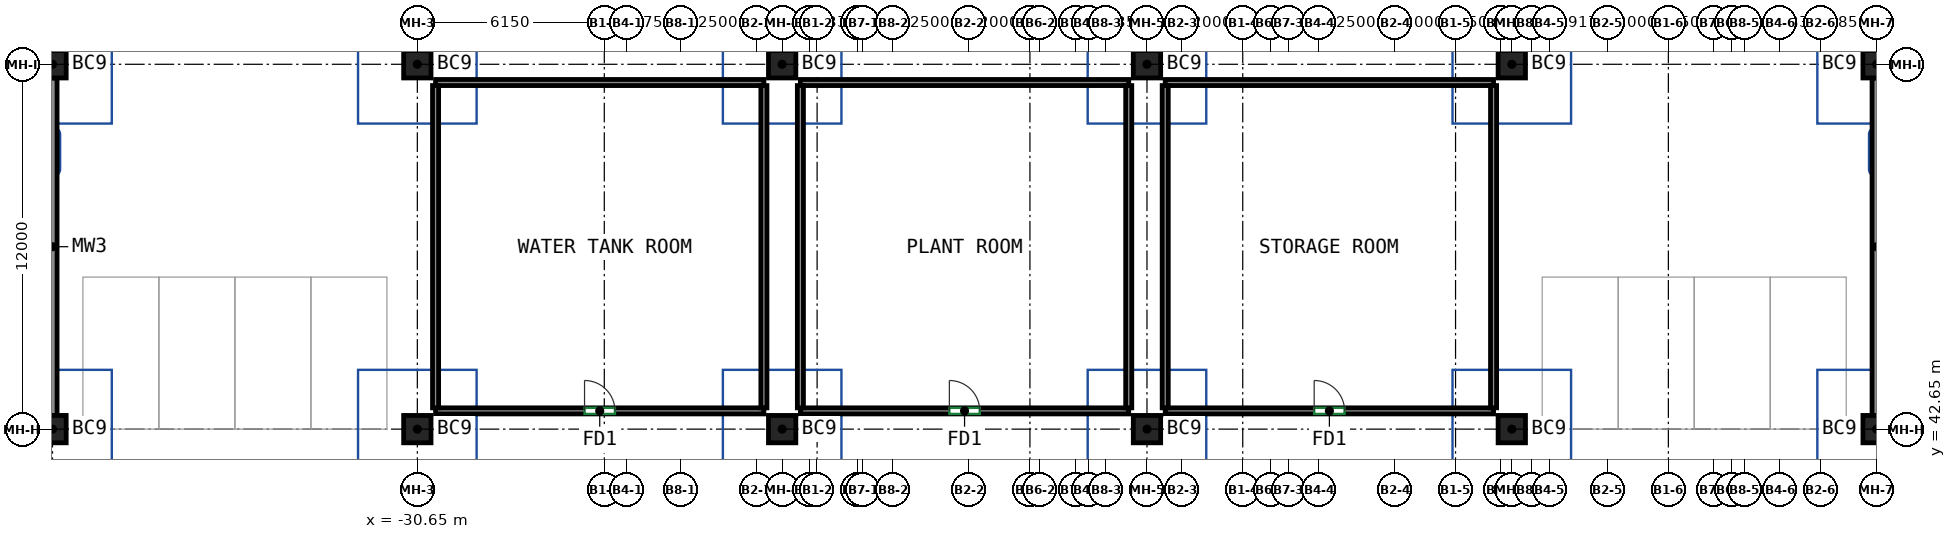
"""IFC4 building model, lengths in metres.
Left out: names, types, materials, properties, quantities, classifications, styles, units other than length and angle.
Written with IfcOpenShell. Run it as: python <this file> out.ifc"""

import sys

from ifc_helpers import new_model, si_unit, direction, frame, frame_2d, origin, origin_2d, place, context, subcontext, project, spatial, rectangle, extrude, source, transform, mapped, element, fill, save


model = new_model("IFC4")
c1 = context("Model", 3, precision=1e-05, world=origin(), true_north=direction((0.0, 1.0)))
c2 = subcontext(c1, "Body", "Model", "MODEL_VIEW")
j1 = project(units=[si_unit("LENGTHUNIT", "METRE"), si_unit("PLANEANGLEUNIT", "RADIAN")], contexts=[c1])
p1 = place(None, origin())
s1 = spatial("IfcSite", under=j1, at=p1, CompositionType="ELEMENT")
p2 = place(p1, origin())
s2 = spatial("IfcBuilding", under=s1, at=p2, CompositionType="ELEMENT")
p3 = place(p2, frame((0.0, 0.0, -9.0)))
s3 = spatial("IfcBuildingStorey", under=s2, at=p3, CompositionType="ELEMENT", Elevation=-9.0)
m1 = source(origin(), c2, "Body", "SweptSolid", [
    extrude(rectangle(XDim=11.1, YDim=0.3, at=frame_2d((5.55, 0.0))), origin(), (0.0, 0.0, 1.0), 4.1),
])
for number, where, z_axis, x_axis in (
    (1, (-42.65, 54.2, 0.0), (0.0, 0.0, 1.0), (0.0, -1.0, 0.0)),
    (2, (17.35, 54.2, 0.0), (0.0, 0.0, 1.0), (0.0, -1.0, 0.0)),
):
    element("IfcWall", number, at=place(p3, frame(where, z_axis=z_axis, x_axis=x_axis)), inside=s3, PredefinedType="SHEAR", context=c2, shape_type="MappedRepresentation", body=[
        mapped(m1, transform((0.0, 0.0, 0.0))),
    ])
m2 = source(origin(), c2, "Body", "SweptSolid", [
    extrude(rectangle(XDim=0.9, YDim=0.9, at=origin_2d()), origin(), (0.0, 0.0, 1.0), 4.5),
])
for number, where, z_axis, x_axis in (
    (3, (-42.65, 42.65, 0.0), (0.0, 0.0, 1.0), (1.0, 0.0, 0.0)),
    (4, (-42.65, 54.65, 0.0), (0.0, 0.0, 1.0), (1.0, 0.0, 0.0)),
    (5, (-30.65, 42.65, 0.0), (0.0, 0.0, 1.0), (1.0, 0.0, 0.0)),
    (6, (-30.65, 54.65, 0.0), (0.0, 0.0, 1.0), (1.0, 0.0, 0.0)),
    (7, (-18.65, 42.65, 0.0), (0.0, 0.0, 1.0), (1.0, 0.0, 0.0)),
    (8, (-18.65, 54.65, 0.0), (0.0, 0.0, 1.0), (1.0, 0.0, 0.0)),
    (9, (-6.65, 42.65, 0.0), (0.0, 0.0, 1.0), (1.0, 0.0, 0.0)),
    (10, (-6.65, 54.65, 0.0), (0.0, 0.0, 1.0), (1.0, 0.0, 0.0)),
    (11, (5.35, 42.65, 0.0), (0.0, 0.0, 1.0), (1.0, 0.0, 0.0)),
    (12, (5.35, 54.65, 0.0), (0.0, 0.0, 1.0), (1.0, 0.0, 0.0)),
    (13, (17.35, 42.65, 0.0), (0.0, 0.0, 1.0), (1.0, 0.0, 0.0)),
    (14, (17.35, 54.65, 0.0), (0.0, 0.0, 1.0), (1.0, 0.0, 0.0)),
):
    element("IfcColumn", number, at=place(p3, frame(where, z_axis=z_axis, x_axis=x_axis)), inside=s3, PredefinedType="COLUMN", context=c2, shape_type="MappedRepresentation", body=[
        mapped(m2, transform((0.0, 0.0, 0.0))),
    ])
m3 = source(origin(), c2, "Body", "SweptSolid", [
    extrude(rectangle(XDim=10.8, YDim=0.2, at=frame_2d((5.4, 0.0))), origin(), (0.0, 0.0, 1.0), 4.1),
])
p4 = place(p3, frame((-30.05, 43.25, 0.0), z_axis=(0.0, 0.0, 1.0), x_axis=(1.0, 0.0, 0.0)))
e15 = element("IfcWall", 15, at=p4, inside=s3, PredefinedType="PARTITIONING", context=c2, shape_type="MappedRepresentation", body=[
    mapped(m3, transform((0.0, 0.0, 0.0))),
])
p5 = place(p4, frame((4.9, 0.0, 0.0)))
e16 = element("IfcOpeningElement", 16, at=p5, cuts=e15, PredefinedType="OPENING", context=c2, shape_type="SweptSolid", body=[
    extrude(rectangle(XDim=1.0, YDim=2.1, at=frame_2d((0.5, 1.05))), frame((0.0, 0.11, 0.0), z_axis=(0.0, -1.0, 0.0), x_axis=(1.0, 0.0, 0.0)), (0.0, 0.0, 1.0), 0.22),
])
p6 = place(p3, frame((-30.05, 54.05, 0.0), z_axis=(0.0, 0.0, 1.0), x_axis=(1.0, 0.0, 0.0)))
e17 = element("IfcWall", 17, at=p6, inside=s3, PredefinedType="PARTITIONING", context=c2, shape_type="MappedRepresentation", body=[
    mapped(m3, transform((0.0, 0.0, 0.0))),
])
m4 = source(origin(), c2, "Body", "SweptSolid", [
    extrude(rectangle(XDim=10.6, YDim=0.2, at=frame_2d((5.3, 0.0))), origin(), (0.0, 0.0, 1.0), 4.1),
])
for number, where, z_axis, x_axis in (
    (18, (-30.05, 43.35, 0.0), (0.0, 0.0, 1.0), (0.0, 1.0, 0.0)),
    (19, (-19.25, 43.35, 0.0), (0.0, 0.0, 1.0), (0.0, 1.0, 0.0)),
):
    element("IfcWall", number, at=place(p3, frame(where, z_axis=z_axis, x_axis=x_axis)), inside=s3, PredefinedType="PARTITIONING", context=c2, shape_type="MappedRepresentation", body=[
        mapped(m4, transform((0.0, 0.0, 0.0))),
    ])
p7 = place(p3, frame((-18.05, 43.25, 0.0), z_axis=(0.0, 0.0, 1.0), x_axis=(1.0, 0.0, 0.0)))
e20 = element("IfcWall", 20, at=p7, inside=s3, PredefinedType="PARTITIONING", context=c2, shape_type="MappedRepresentation", body=[
    mapped(m3, transform((0.0, 0.0, 0.0))),
])
p8 = place(p7, frame((4.9, 0.0, 0.0)))
e21 = element("IfcOpeningElement", 21, at=p8, cuts=e20, PredefinedType="OPENING", context=c2, shape_type="SweptSolid", body=[
    extrude(rectangle(XDim=1.0, YDim=2.1, at=frame_2d((0.5, 1.05))), frame((0.0, 0.11, 0.0), z_axis=(0.0, -1.0, 0.0), x_axis=(1.0, 0.0, 0.0)), (0.0, 0.0, 1.0), 0.22),
])
p9 = place(p3, frame((-18.05, 54.05, 0.0), z_axis=(0.0, 0.0, 1.0), x_axis=(1.0, 0.0, 0.0)))
e22 = element("IfcWall", 22, at=p9, inside=s3, PredefinedType="PARTITIONING", context=c2, shape_type="MappedRepresentation", body=[
    mapped(m3, transform((0.0, 0.0, 0.0))),
])
for number, where, z_axis, x_axis in (
    (23, (-18.05, 43.35, 0.0), (0.0, 0.0, 1.0), (0.0, 1.0, 0.0)),
    (24, (-7.25, 43.35, 0.0), (0.0, 0.0, 1.0), (0.0, 1.0, 0.0)),
):
    element("IfcWall", number, at=place(p3, frame(where, z_axis=z_axis, x_axis=x_axis)), inside=s3, PredefinedType="PARTITIONING", context=c2, shape_type="MappedRepresentation", body=[
        mapped(m4, transform((0.0, 0.0, 0.0))),
    ])
p10 = place(p3, frame((-6.05, 43.25, 0.0), z_axis=(0.0, 0.0, 1.0), x_axis=(1.0, 0.0, 0.0)))
e25 = element("IfcWall", 25, at=p10, inside=s3, PredefinedType="PARTITIONING", context=c2, shape_type="MappedRepresentation", body=[
    mapped(m3, transform((0.0, 0.0, 0.0))),
])
p11 = place(p10, frame((4.9, 0.0, 0.0)))
e26 = element("IfcOpeningElement", 26, at=p11, cuts=e25, PredefinedType="OPENING", context=c2, shape_type="SweptSolid", body=[
    extrude(rectangle(XDim=1.0, YDim=2.1, at=frame_2d((0.5, 1.05))), frame((0.0, 0.11, 0.0), z_axis=(0.0, -1.0, 0.0), x_axis=(1.0, 0.0, 0.0)), (0.0, 0.0, 1.0), 0.22),
])
p12 = place(p3, frame((-6.05, 54.05, 0.0), z_axis=(0.0, 0.0, 1.0), x_axis=(1.0, 0.0, 0.0)))
e27 = element("IfcWall", 27, at=p12, inside=s3, PredefinedType="PARTITIONING", context=c2, shape_type="MappedRepresentation", body=[
    mapped(m3, transform((0.0, 0.0, 0.0))),
])
for number, where, z_axis, x_axis in (
    (28, (-6.05, 43.35, 0.0), (0.0, 0.0, 1.0), (0.0, 1.0, 0.0)),
    (29, (4.75, 43.35, 0.0), (0.0, 0.0, 1.0), (0.0, 1.0, 0.0)),
):
    element("IfcWall", number, at=place(p3, frame(where, z_axis=z_axis, x_axis=x_axis)), inside=s3, PredefinedType="PARTITIONING", context=c2, shape_type="MappedRepresentation", body=[
        mapped(m4, transform((0.0, 0.0, 0.0))),
    ])
p13 = place(p5, origin())
e30 = element("IfcDoor", 30, at=p13, inside=s3, OperationType="SINGLE_SWING_LEFT", PredefinedType="DOOR", context=c2, shape_type="SweptSolid", body=[
    extrude(rectangle(XDim=1.0, YDim=2.1, at=frame_2d((0.5, 1.05))), frame((0.0, 0.025, 0.0), z_axis=(0.0, -1.0, 0.0), x_axis=(1.0, 0.0, 0.0)), (0.0, 0.0, 1.0), 0.05),
])
fill(e16, e30)
p14 = place(p8, origin())
e31 = element("IfcDoor", 31, at=p14, inside=s3, OperationType="SINGLE_SWING_LEFT", PredefinedType="DOOR", context=c2, shape_type="SweptSolid", body=[
    extrude(rectangle(XDim=1.0, YDim=2.1, at=frame_2d((0.5, 1.05))), frame((0.0, 0.025, 0.0), z_axis=(0.0, -1.0, 0.0), x_axis=(1.0, 0.0, 0.0)), (0.0, 0.0, 1.0), 0.05),
])
fill(e21, e31)
p15 = place(p11, origin())
e32 = element("IfcDoor", 32, at=p15, inside=s3, OperationType="SINGLE_SWING_LEFT", PredefinedType="DOOR", context=c2, shape_type="SweptSolid", body=[
    extrude(rectangle(XDim=1.0, YDim=2.1, at=frame_2d((0.5, 1.05))), frame((0.0, 0.025, 0.0), z_axis=(0.0, -1.0, 0.0), x_axis=(1.0, 0.0, 0.0)), (0.0, 0.0, 1.0), 0.05),
])
fill(e26, e32)
save(model, sys.argv[1])
